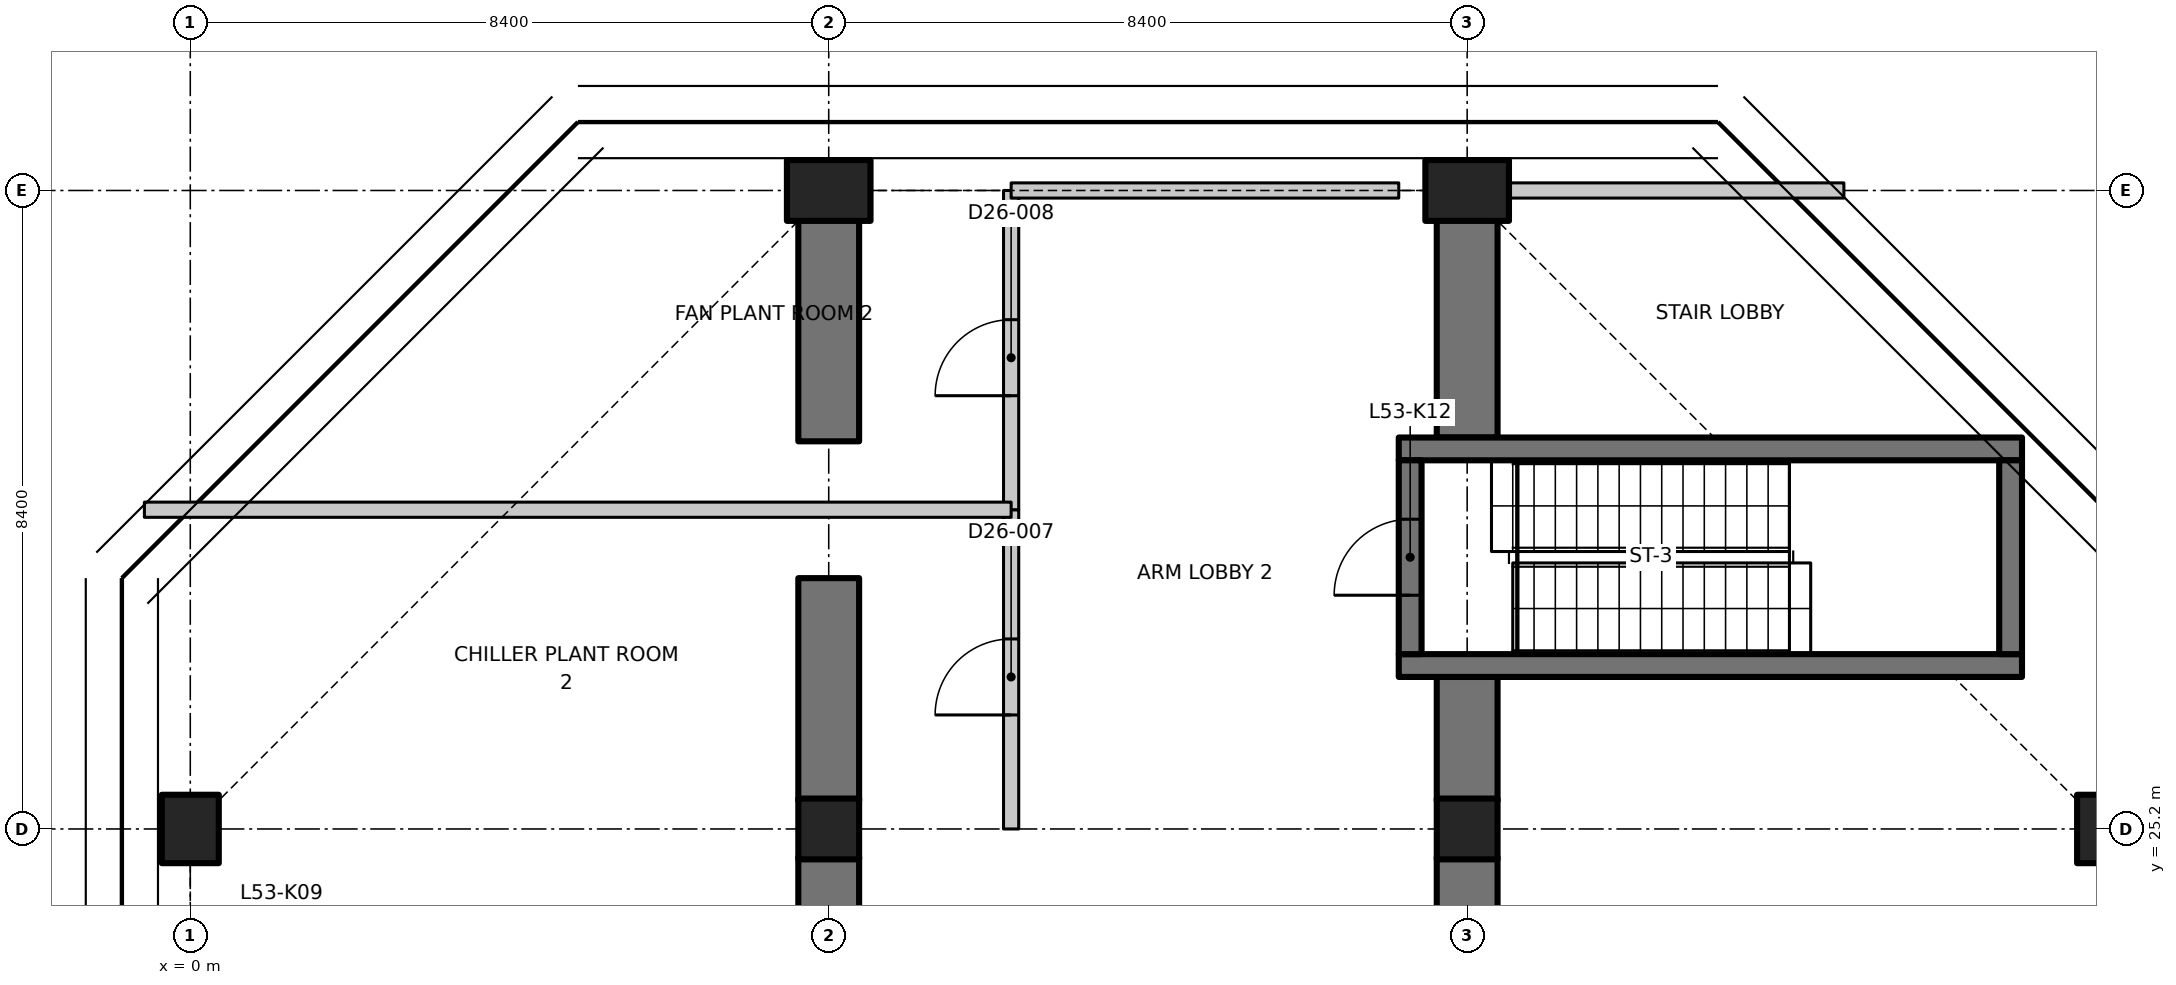
"""IFC4 building model, lengths in metres.
Left out: names, types, materials, properties, quantities, classifications, styles, units other than length and angle.
Written with IfcOpenShell. Run it as: python <this file> out.ifc"""

import sys

from ifc_helpers import new_model, si_unit, direction, frame, frame_2d, origin, origin_2d, place, context, subcontext, project, spatial, polyline, rectangle, outline, extrude, element, fill, save


model = new_model("IFC4")
c1 = context("Model", 3, precision=1e-05, world=origin(), true_north=direction((0.0, 1.0)))
c2 = subcontext(c1, "Body", "Model", "MODEL_VIEW")
j1 = project(units=[si_unit("LENGTHUNIT", "METRE"), si_unit("PLANEANGLEUNIT", "RADIAN")], contexts=[c1])
p1 = place(None, origin())
s1 = spatial("IfcSite", under=j1, at=p1, CompositionType="ELEMENT")
p2 = place(p1, origin())
s2 = spatial("IfcBuilding", under=s1, at=p2, CompositionType="ELEMENT")
p3 = place(p2, frame((0.0, 0.0, 210.9)))
s3 = spatial("IfcBuildingStorey", under=s2, at=p3, CompositionType="ELEMENT", Elevation=210.9)
p4 = place(p3, frame((0.0, 25.2, 0.0), z_axis=(0.0, 0.0, 1.0), x_axis=(1.0, 0.0, 0.0)))
e1 = element("IfcColumn", 1, at=p4, inside=s3, PredefinedType="COLUMN", context=c2, shape_type="SweptSolid", body=[
    extrude(rectangle(XDim=0.75, YDim=0.9, at=origin_2d()), origin(), (0.0, 0.0, 1.0), 4.55),
])
p5 = place(p3, frame((8.4, 25.2, 0.0), z_axis=(0.0, 0.0, 1.0), x_axis=(1.0, 0.0, 0.0)))
e2 = element("IfcColumn", 2, at=p5, inside=s3, PredefinedType="COLUMN", context=c2, shape_type="SweptSolid", body=[
    extrude(rectangle(XDim=0.8, YDim=0.8, at=origin_2d()), origin(), (0.0, 0.0, 1.0), 4.55),
])
p6 = place(p3, frame((8.4, 33.6, 0.0), z_axis=(0.0, 0.0, 1.0), x_axis=(0.0, 1.0, 0.0)))
e3 = element("IfcColumn", 3, at=p6, inside=s3, PredefinedType="COLUMN", context=c2, shape_type="SweptSolid", body=[
    extrude(rectangle(XDim=0.8, YDim=1.1, at=origin_2d()), origin(), (0.0, 0.0, 1.0), 4.55),
])
p7 = place(p3, frame((16.8, 25.2, 0.0), z_axis=(0.0, 0.0, 1.0), x_axis=(1.0, 0.0, 0.0)))
e4 = element("IfcColumn", 4, at=p7, inside=s3, PredefinedType="COLUMN", context=c2, shape_type="SweptSolid", body=[
    extrude(rectangle(XDim=0.8, YDim=0.8, at=origin_2d()), origin(), (0.0, 0.0, 1.0), 4.55),
])
p8 = place(p3, frame((16.8, 33.6, 0.0), z_axis=(0.0, 0.0, 1.0), x_axis=(0.0, 1.0, 0.0)))
e5 = element("IfcColumn", 5, at=p8, inside=s3, PredefinedType="COLUMN", context=c2, shape_type="SweptSolid", body=[
    extrude(rectangle(XDim=0.8, YDim=1.1, at=origin_2d()), origin(), (0.0, 0.0, 1.0), 4.55),
])
p9 = place(p3, frame((25.2, 25.2, 0.0), z_axis=(0.0, 0.0, 1.0), x_axis=(1.0, 0.0, 0.0)))
e6 = element("IfcColumn", 6, at=p9, inside=s3, PredefinedType="COLUMN", context=c2, shape_type="SweptSolid", body=[
    extrude(rectangle(XDim=0.75, YDim=0.9, at=origin_2d()), origin(), (0.0, 0.0, 1.0), 4.55),
])
p10 = place(p3, frame((8.4, 23.05, 0.0), z_axis=(0.0, 0.0, 1.0), x_axis=(0.0, 1.0, 0.0)))
e7 = element("IfcWall", 7, at=p10, inside=s3, PredefinedType="SHEAR", context=c2, shape_type="SweptSolid", body=[
    extrude(rectangle(XDim=1.78, YDim=0.8, at=frame_2d((0.89, 0.0))), origin(), (0.0, 0.0, 1.0), 4.55),
])
for number, where, z_axis, x_axis in (
    (8, (8.4, 25.57, 0.0), (0.0, 0.0, 1.0), (0.0, 1.0, 0.0)),
    (9, (8.4, 30.3, 0.0), (0.0, 0.0, 1.0), (0.0, 1.0, 0.0)),
):
    element("IfcWall", number, at=place(p3, frame(where, z_axis=z_axis, x_axis=x_axis)), inside=s3, PredefinedType="SHEAR", context=c2, shape_type="SweptSolid", body=[
        extrude(rectangle(XDim=2.93, YDim=0.8, at=frame_2d((1.465, 0.0))), origin(), (0.0, 0.0, 1.0), 4.55),
    ])
p11 = place(p3, frame((16.8, 21.715, 0.0), z_axis=(0.0, 0.0, 1.0), x_axis=(0.0, 1.0, 0.0)))
e10 = element("IfcWall", 10, at=p11, inside=s3, PredefinedType="SHEAR", context=c2, shape_type="SweptSolid", body=[
    extrude(rectangle(XDim=3.115, YDim=0.8, at=frame_2d((1.558, 0.0))), origin(), (0.0, 0.0, 1.0), 4.55),
])
p12 = place(p3, frame((16.8, 30.35, 0.0), z_axis=(0.0, 0.0, 1.0), x_axis=(0.0, 1.0, 0.0)))
e11 = element("IfcWall", 11, at=p12, inside=s3, PredefinedType="SHEAR", context=c2, shape_type="SweptSolid", body=[
    extrude(rectangle(XDim=2.88, YDim=0.8, at=frame_2d((1.44, 0.0))), origin(), (0.0, 0.0, 1.0), 4.55),
])
p13 = place(p3, frame((16.8, 25.57, 0.0), z_axis=(0.0, 0.0, 1.0), x_axis=(0.0, 1.0, 0.0)))
e12 = element("IfcWall", 12, at=p13, inside=s3, PredefinedType="SHEAR", context=c2, shape_type="SweptSolid", body=[
    extrude(rectangle(XDim=1.63, YDim=0.8, at=frame_2d((0.815, 0.0))), origin(), (0.0, 0.0, 1.0), 4.55),
])
for number, where, z_axis, x_axis in (
    (13, (15.9, 27.35, 0.0), (0.0, 0.0, 1.0), (1.0, 0.0, 0.0)),
    (14, (15.9, 30.2, 0.0), (0.0, 0.0, 1.0), (1.0, 0.0, 0.0)),
):
    element("IfcWall", number, at=place(p3, frame(where, z_axis=z_axis, x_axis=x_axis)), inside=s3, PredefinedType="SHEAR", context=c2, shape_type="SweptSolid", body=[
        extrude(rectangle(XDim=8.2, YDim=0.3, at=frame_2d((4.1, 0.0))), origin(), (0.0, 0.0, 1.0), 4.55),
    ])
p14 = place(p3, frame((16.05, 27.5, 0.0), z_axis=(0.0, 0.0, 1.0), x_axis=(0.0, 1.0, 0.0)))
e15 = element("IfcWall", 15, at=p14, inside=s3, PredefinedType="SHEAR", context=c2, shape_type="SweptSolid", body=[
    extrude(rectangle(XDim=2.55, YDim=0.3, at=frame_2d((1.275, 0.0))), origin(), (0.0, 0.0, 1.0), 4.55),
])
p15 = place(p14, frame((0.775, 0.0, 0.0)))
e16 = element("IfcOpeningElement", 16, at=p15, cuts=e15, PredefinedType="OPENING", context=c2, shape_type="SweptSolid", body=[
    extrude(rectangle(XDim=1.0, YDim=2.1, at=frame_2d((0.5, 1.05))), frame((0.0, 0.16, 0.0), z_axis=(0.0, -1.0, 0.0), x_axis=(1.0, 0.0, 0.0)), (0.0, 0.0, 1.0), 0.32),
])
p16 = place(p3, frame((23.95, 27.5, 0.0), z_axis=(0.0, 0.0, 1.0), x_axis=(0.0, 1.0, 0.0)))
e17 = element("IfcWall", 17, at=p16, inside=s3, PredefinedType="SHEAR", context=c2, shape_type="SweptSolid", body=[
    extrude(rectangle(XDim=2.55, YDim=0.3, at=frame_2d((1.275, 0.0))), origin(), (0.0, 0.0, 1.0), 4.55),
])
p17 = place(p3, frame((10.8, 25.2, 0.0), z_axis=(0.0, 0.0, 1.0), x_axis=(0.0, 1.0, 0.0)))
e18 = element("IfcWall", 18, at=p17, inside=s3, PredefinedType="PARTITIONING", context=c2, shape_type="SweptSolid", body=[
    extrude(rectangle(XDim=4.2, YDim=0.2, at=frame_2d((2.1, 0.0))), origin(), (0.0, 0.0, 1.0), 4.53),
])
p18 = place(p17, frame((1.5, 0.0, 0.0)))
e19 = element("IfcOpeningElement", 19, at=p18, cuts=e18, PredefinedType="OPENING", context=c2, shape_type="SweptSolid", body=[
    extrude(rectangle(XDim=1.0, YDim=2.1, at=frame_2d((0.5, 1.05))), frame((0.0, 0.11, 0.0), z_axis=(0.0, -1.0, 0.0), x_axis=(1.0, 0.0, 0.0)), (0.0, 0.0, 1.0), 0.22),
])
p19 = place(p3, frame((10.8, 29.4, 0.0), z_axis=(0.0, 0.0, 1.0), x_axis=(0.0, 1.0, 0.0)))
e20 = element("IfcWall", 20, at=p19, inside=s3, PredefinedType="PARTITIONING", context=c2, shape_type="SweptSolid", body=[
    extrude(rectangle(XDim=4.2, YDim=0.2, at=frame_2d((2.1, 0.0))), origin(), (0.0, 0.0, 1.0), 4.18),
])
p20 = place(p19, frame((1.5, 0.0, 0.0)))
e21 = element("IfcOpeningElement", 21, at=p20, cuts=e20, PredefinedType="OPENING", context=c2, shape_type="SweptSolid", body=[
    extrude(rectangle(XDim=1.0, YDim=2.1, at=frame_2d((0.5, 1.05))), frame((0.0, 0.11, 0.0), z_axis=(0.0, -1.0, 0.0), x_axis=(1.0, 0.0, 0.0)), (0.0, 0.0, 1.0), 0.22),
])
p21 = place(p3, frame((10.8, 33.6, 0.0), z_axis=(0.0, 0.0, 1.0), x_axis=(1.0, 0.0, 0.0)))
e22 = element("IfcWall", 22, at=p21, inside=s3, PredefinedType="PARTITIONING", context=c2, shape_type="SweptSolid", body=[
    extrude(outline(polyline([(0.0, 0.0), (5.1, 0.0), (5.1, 4.18), (0.0, 4.18), (0.0, 0.0)])), frame((0.0, 0.1, 0.0), z_axis=(0.0, -1.0, 0.0), x_axis=(1.0, 0.0, 0.0)), (0.0, 0.0, 1.0), 0.2),
])
p22 = place(p3, frame((17.37, 33.6, 0.0), z_axis=(0.0, 0.0, 1.0), x_axis=(1.0, 0.0, 0.0)))
e23 = element("IfcWall", 23, at=p22, inside=s3, PredefinedType="PARTITIONING", context=c2, shape_type="SweptSolid", body=[
    extrude(rectangle(XDim=4.386, YDim=0.2, at=frame_2d((2.193, 0.0))), origin(), (0.0, 0.0, 1.0), 4.18),
])
p23 = place(p3, frame((-0.604, 29.4, 0.0), z_axis=(0.0, 0.0, 1.0), x_axis=(1.0, 0.0, 0.0)))
e24 = element("IfcWall", 24, at=p23, inside=s3, PredefinedType="PARTITIONING", context=c2, shape_type="SweptSolid", body=[
    extrude(outline(polyline([(0.0, 0.0), (11.404, 0.0), (11.404, 4.53), (5.52, 4.53), (5.518, 4.18), (4.09, 4.18), (4.088, 4.53), (0.404, 4.53), (0.0, 4.53), (0.0, 0.0)])), frame((0.0, 0.1, 0.0), z_axis=(0.0, -1.0, 0.0), x_axis=(1.0, 0.0, 0.0)), (0.0, 0.0, 1.0), 0.2),
])
p24 = place(p15, origin())
e25 = element("IfcDoor", 25, at=p24, inside=s3, OperationType="SINGLE_SWING_RIGHT", PredefinedType="DOOR", context=c2, shape_type="SweptSolid", body=[
    extrude(rectangle(XDim=1.0, YDim=2.1, at=frame_2d((0.5, 1.05))), frame((0.0, 0.025, 0.0), z_axis=(0.0, -1.0, 0.0), x_axis=(1.0, 0.0, 0.0)), (0.0, 0.0, 1.0), 0.05),
])
fill(e16, e25)
p25 = place(p18, origin())
e26 = element("IfcDoor", 26, at=p25, inside=s3, OperationType="SINGLE_SWING_LEFT", PredefinedType="DOOR", context=c2, shape_type="SweptSolid", body=[
    extrude(rectangle(XDim=1.0, YDim=2.1, at=frame_2d((0.5, 1.05))), frame((0.0, 0.025, 0.0), z_axis=(0.0, -1.0, 0.0), x_axis=(1.0, 0.0, 0.0)), (0.0, 0.0, 1.0), 0.05),
])
fill(e19, e26)
p26 = place(p20, origin())
e27 = element("IfcDoor", 27, at=p26, inside=s3, OperationType="SINGLE_SWING_LEFT", PredefinedType="DOOR", context=c2, shape_type="SweptSolid", body=[
    extrude(rectangle(XDim=1.0, YDim=2.1, at=frame_2d((0.5, 1.05))), frame((0.0, 0.025, 0.0), z_axis=(0.0, -1.0, 0.0), x_axis=(1.0, 0.0, 0.0)), (0.0, 0.0, 1.0), 0.05),
])
fill(e21, e27)
save(model, sys.argv[1])
